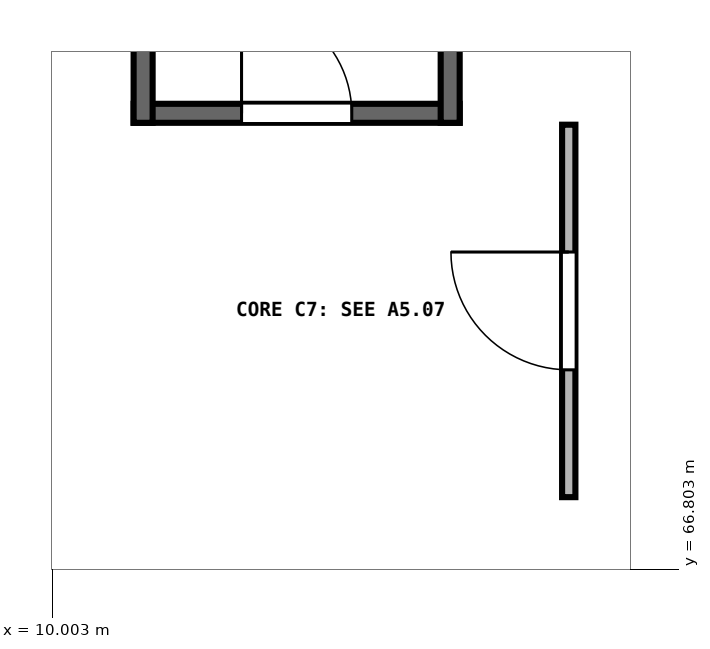
"""IFC4 building model, lengths in metres.
Left out: names, types, materials, properties, quantities, classifications, styles, units other than length and angle.
Written with IfcOpenShell. Run it as: python <this file> out.ifc"""

import sys

from ifc_helpers import new_model, si_unit, direction, frame, frame_2d, origin, place, context, subcontext, project, spatial, rectangle, extrude, element, fill, save


model = new_model("IFC4")
c1 = context("Model", 3, precision=1e-05, world=origin(), true_north=direction((0.0, 1.0)))
c2 = subcontext(c1, "Body", "Model", "MODEL_VIEW")
j1 = project(units=[si_unit("LENGTHUNIT", "METRE"), si_unit("PLANEANGLEUNIT", "RADIAN")], contexts=[c1])
p1 = place(None, origin())
s1 = spatial("IfcSite", under=j1, at=p1, CompositionType="ELEMENT")
p2 = place(p1, origin())
s2 = spatial("IfcBuilding", under=s1, at=p2, CompositionType="ELEMENT")
p3 = place(p2, frame((0.0, 0.0, 10.2)))
s3 = spatial("IfcBuildingStorey", under=s2, at=p3, CompositionType="ELEMENT", Elevation=10.2)
p4 = place(p3, frame((11.075, 72.8, 0.0), z_axis=(0.0, 0.0, 1.0), x_axis=(1.0, 0.0, 0.0)))
e1 = element("IfcWall", 1, at=p4, inside=s3, PredefinedType="SHEAR", context=c2, shape_type="SweptSolid", body=[
    extrude(rectangle(XDim=4.29, YDim=0.25, at=frame_2d((2.145, 0.0))), origin(), (0.0, 0.0, 1.0), 4.24),
])
p5 = place(p4, frame((1.42, 0.0, 0.0)))
e2 = element("IfcOpeningElement", 2, at=p5, cuts=e1, PredefinedType="OPENING", context=c2, shape_type="SweptSolid", body=[
    extrude(rectangle(XDim=1.45, YDim=2.2, at=frame_2d((0.725, 1.1))), frame((0.0, 0.135, 0.0), z_axis=(0.0, -1.0, 0.0), x_axis=(1.0, 0.0, 0.0)), (0.0, 0.0, 1.0), 0.27),
])
for number, where, z_axis, x_axis in (
    (3, (11.2, 72.675, 0.0), (0.0, 0.0, 1.0), (0.0, 1.0, 0.0)),
    (4, (15.24, 72.675, 0.0), (0.0, 0.0, 1.0), (0.0, 1.0, 0.0)),
):
    element("IfcWall", number, at=place(p3, frame(where, z_axis=z_axis, x_axis=x_axis)), inside=s3, PredefinedType="SHEAR", context=c2, shape_type="SweptSolid", body=[
        extrude(rectangle(XDim=11.09, YDim=0.25, at=frame_2d((5.545, 0.0))), origin(), (0.0, 0.0, 1.0), 4.24),
    ])
p6 = place(p3, frame((16.8, 67.75, 0.0), z_axis=(0.0, 0.0, 1.0), x_axis=(0.0, 1.0, 0.0)))
e5 = element("IfcWall", 5, at=p6, inside=s3, PredefinedType="PARTITIONING", context=c2, shape_type="SweptSolid", body=[
    extrude(rectangle(XDim=4.9, YDim=0.175, at=frame_2d((2.45, 0.0))), origin(), (0.0, 0.0, 1.0), 4.19),
])
p7 = place(p6, frame((1.675, 0.0, 0.0)))
e6 = element("IfcOpeningElement", 6, at=p7, cuts=e5, PredefinedType="OPENING", context=c2, shape_type="SweptSolid", body=[
    extrude(rectangle(XDim=1.55, YDim=2.22, at=frame_2d((0.775, 1.11))), frame((0.0, 0.097, 0.0), z_axis=(0.0, -1.0, 0.0), x_axis=(1.0, 0.0, 0.0)), (0.0, 0.0, 1.0), 0.195),
])
p8 = place(p5, origin())
e7 = element("IfcDoor", 7, at=p8, inside=s3, OperationType="SINGLE_SWING_LEFT", PredefinedType="DOOR", context=c2, shape_type="SweptSolid", body=[
    extrude(rectangle(XDim=1.45, YDim=2.2, at=frame_2d((0.725, 1.1))), frame((0.0, 0.025, 0.0), z_axis=(0.0, -1.0, 0.0), x_axis=(1.0, 0.0, 0.0)), (0.0, 0.0, 1.0), 0.05),
])
fill(e2, e7)
p9 = place(p7, origin())
e8 = element("IfcDoor", 8, at=p9, inside=s3, OperationType="SINGLE_SWING_RIGHT", PredefinedType="DOOR", context=c2, shape_type="SweptSolid", body=[
    extrude(rectangle(XDim=1.55, YDim=2.22, at=frame_2d((0.775, 1.11))), frame((0.0, 0.025, 0.0), z_axis=(0.0, -1.0, 0.0), x_axis=(1.0, 0.0, 0.0)), (0.0, 0.0, 1.0), 0.05),
])
fill(e6, e8)
save(model, sys.argv[1])
